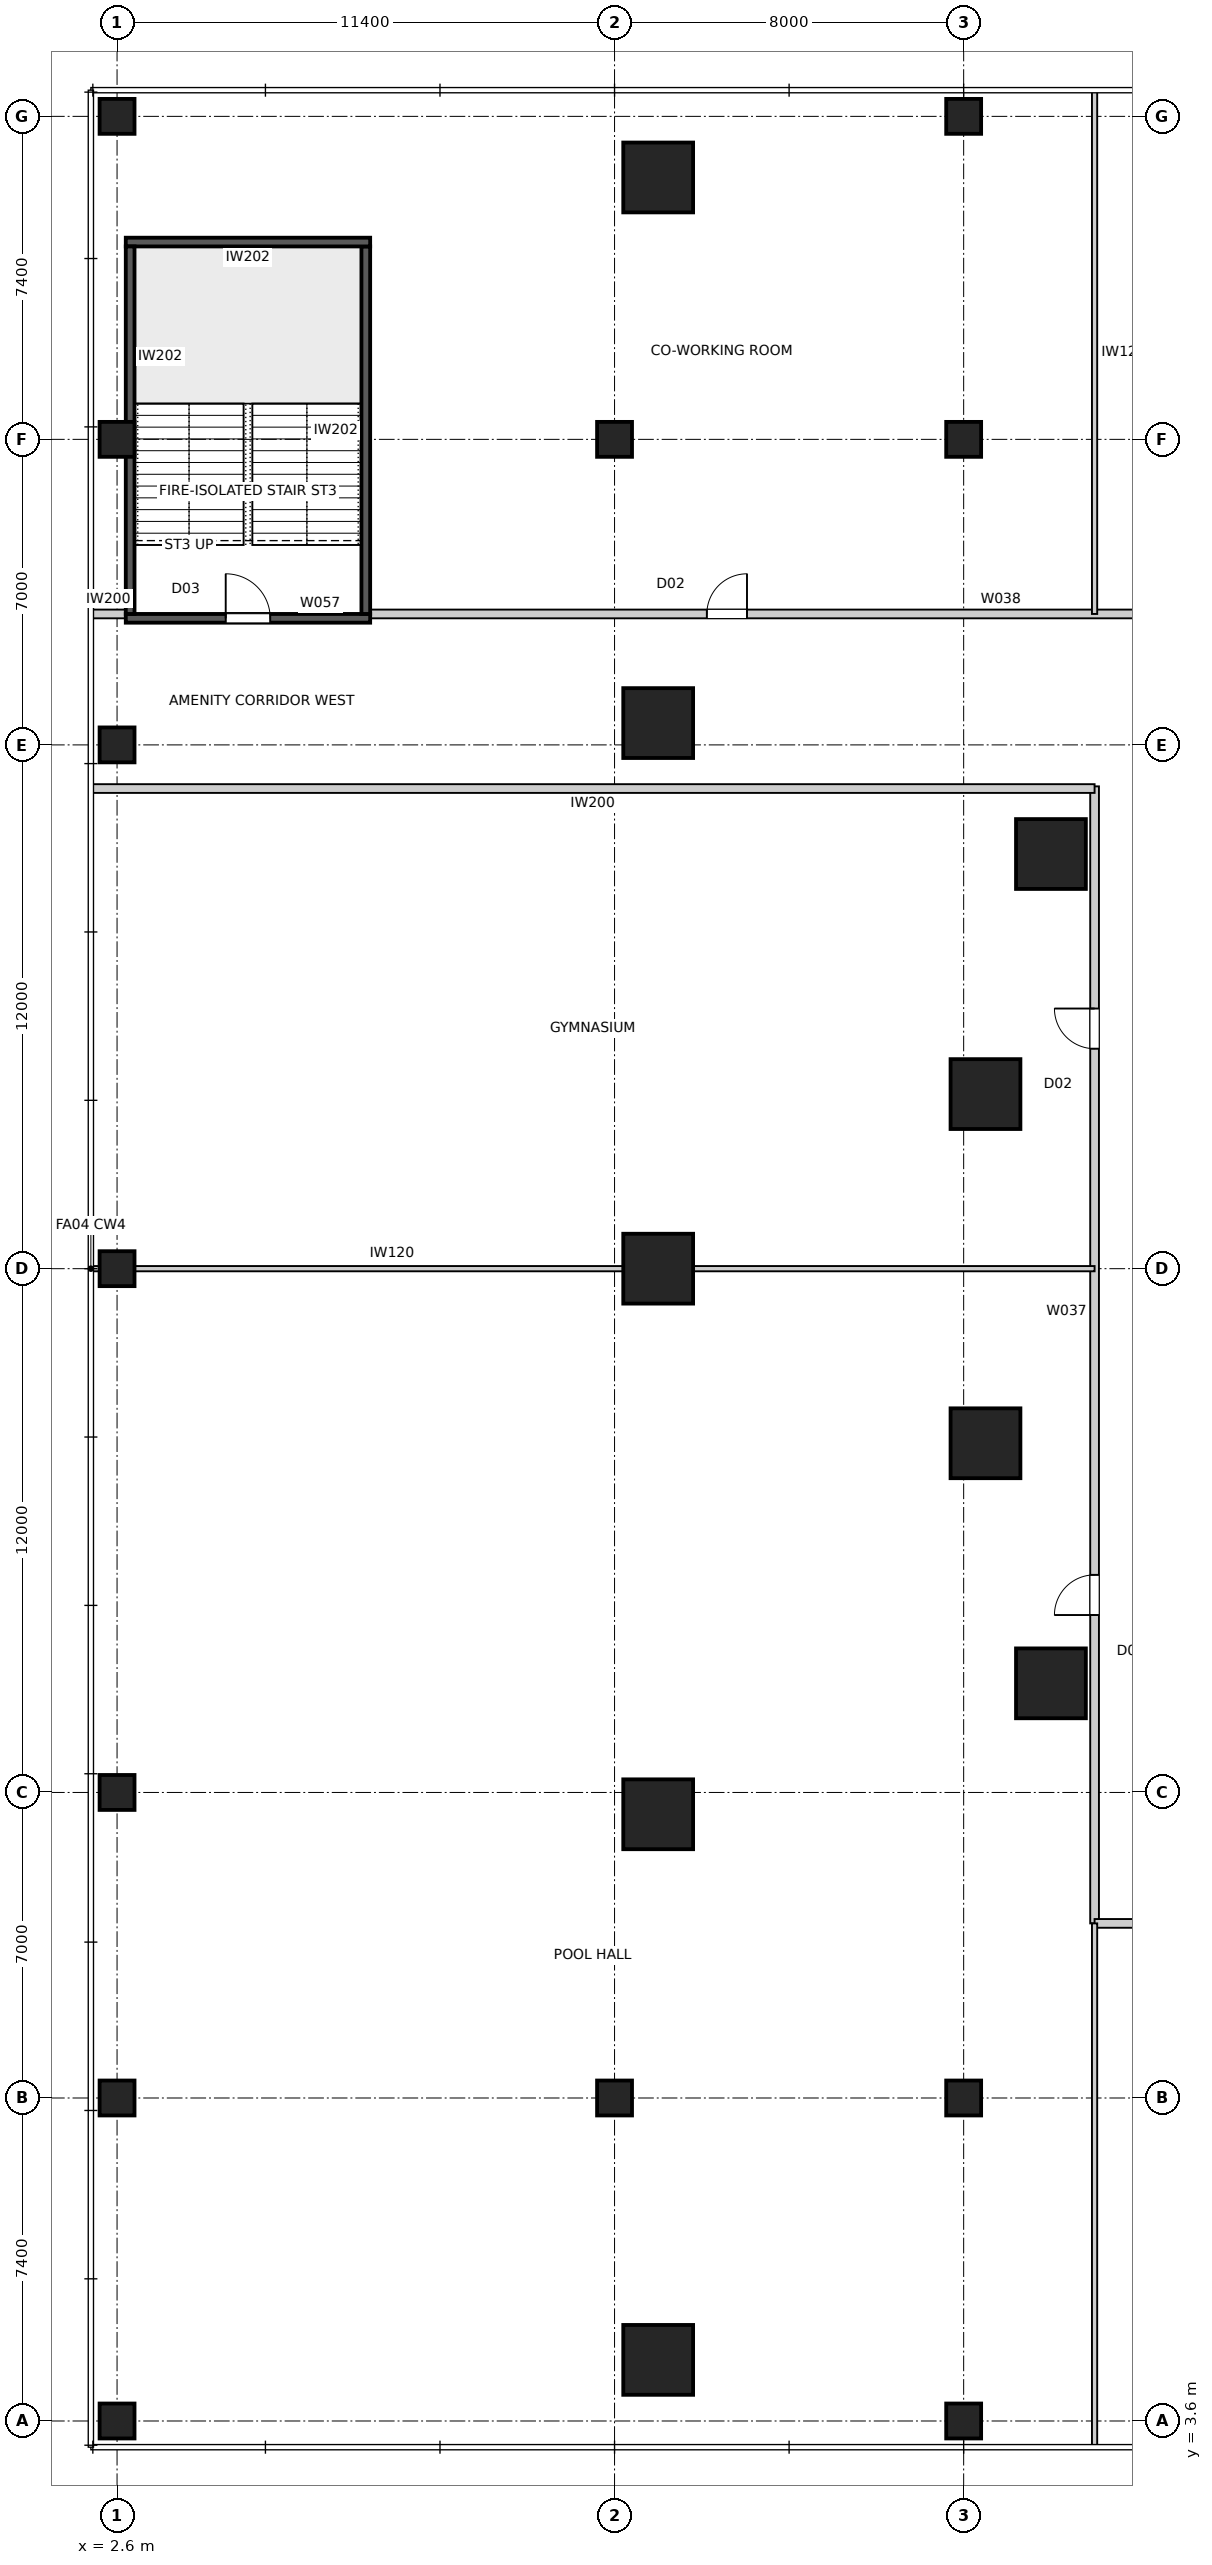
"""IFC4 building model, lengths in metres.
Left out: names, types, materials, properties, quantities, classifications, styles, units other than length and angle.
Written with IfcOpenShell. Run it as: python <this file> out.ifc"""

import sys

from ifc_helpers import new_model, si_unit, direction, frame, frame_2d, origin, origin_2d, place, context, subcontext, project, spatial, rectangle, extrude, element, fill, save


model = new_model("IFC4")
c1 = context("Model", 3, precision=1e-05, world=origin(), true_north=direction((0.0, 1.0)))
c2 = subcontext(c1, "Body", "Model", "MODEL_VIEW")
j1 = project(units=[si_unit("LENGTHUNIT", "METRE"), si_unit("PLANEANGLEUNIT", "RADIAN")], contexts=[c1])
p1 = place(None, origin())
s1 = spatial("IfcSite", under=j1, at=p1, CompositionType="ELEMENT")
p2 = place(p1, origin())
s2 = spatial("IfcBuilding", under=s1, at=p2, CompositionType="ELEMENT")
p3 = place(p2, frame((0.0, 0.0, 6.0)))
s3 = spatial("IfcBuildingStorey", under=s2, at=p3, CompositionType="ELEMENT", Elevation=6.0)
for number, where, z_axis, x_axis in (
    (1, (15.0, 5.0, 0.0), (0.0, 0.0, 1.0), (1.0, 0.0, 0.0)),
    (2, (15.0, 55.0, 0.0), (0.0, 0.0, 1.0), (1.0, 0.0, 0.0)),
    (3, (15.0, 42.5, 0.0), (0.0, 0.0, 1.0), (1.0, 0.0, 0.0)),
    (4, (15.0, 30.0, 0.0), (0.0, 0.0, 1.0), (1.0, 0.0, 0.0)),
    (5, (15.0, 17.5, 0.0), (0.0, 0.0, 1.0), (1.0, 0.0, 0.0)),
):
    element("IfcColumn", number, at=place(p3, frame(where, z_axis=z_axis, x_axis=x_axis)), inside=s3, PredefinedType="COLUMN", context=c2, shape_type="SweptSolid", body=[
        extrude(rectangle(XDim=1.6, YDim=1.6, at=origin_2d()), origin(), (0.0, 0.0, 1.0), 4.5),
    ])
for number, where, z_axis, x_axis in (
    (6, (2.6, 3.6, 0.0), (0.0, 0.0, 1.0), (1.0, 0.0, 0.0)),
    (7, (2.6, 11.0, 0.0), (0.0, 0.0, 1.0), (1.0, 0.0, 0.0)),
    (8, (2.6, 18.0, 0.0), (0.0, 0.0, 1.0), (1.0, 0.0, 0.0)),
    (9, (2.6, 30.0, 0.0), (0.0, 0.0, 1.0), (1.0, 0.0, 0.0)),
    (10, (2.6, 42.0, 0.0), (0.0, 0.0, 1.0), (1.0, 0.0, 0.0)),
    (11, (2.6, 49.0, 0.0), (0.0, 0.0, 1.0), (1.0, 0.0, 0.0)),
    (12, (2.6, 56.4, 0.0), (0.0, 0.0, 1.0), (1.0, 0.0, 0.0)),
    (13, (14.0, 11.0, 0.0), (0.0, 0.0, 1.0), (1.0, 0.0, 0.0)),
    (14, (14.0, 49.0, 0.0), (0.0, 0.0, 1.0), (1.0, 0.0, 0.0)),
    (15, (22.0, 3.6, 0.0), (0.0, 0.0, 1.0), (1.0, 0.0, 0.0)),
    (16, (22.0, 11.0, 0.0), (0.0, 0.0, 1.0), (1.0, 0.0, 0.0)),
    (17, (22.0, 49.0, 0.0), (0.0, 0.0, 1.0), (1.0, 0.0, 0.0)),
    (18, (22.0, 56.4, 0.0), (0.0, 0.0, 1.0), (1.0, 0.0, 0.0)),
):
    element("IfcColumn", number, at=place(p3, frame(where, z_axis=z_axis, x_axis=x_axis)), inside=s3, PredefinedType="COLUMN", context=c2, shape_type="SweptSolid", body=[
        extrude(rectangle(XDim=0.8, YDim=0.8, at=origin_2d()), origin(), (0.0, 0.0, 1.0), 4.5),
    ])
for number, where, z_axis, x_axis in (
    (19, (24.0, 39.5, 0.0), (0.0, 0.0, 1.0), (1.0, 0.0, 0.0)),
    (20, (22.5, 34.0, 0.0), (0.0, 0.0, 1.0), (1.0, 0.0, 0.0)),
    (21, (22.5, 26.0, 0.0), (0.0, 0.0, 1.0), (1.0, 0.0, 0.0)),
    (22, (24.0, 20.5, 0.0), (0.0, 0.0, 1.0), (1.0, 0.0, 0.0)),
):
    element("IfcColumn", number, at=place(p3, frame(where, z_axis=z_axis, x_axis=x_axis)), inside=s3, PredefinedType="COLUMN", context=c2, shape_type="SweptSolid", body=[
        extrude(rectangle(XDim=1.6, YDim=1.6, at=origin_2d()), origin(), (0.0, 0.0, 1.0), 4.5),
    ])
p4 = place(p3, frame((2.8, 44.9, 0.0), z_axis=(0.0, 0.0, 1.0), x_axis=(1.0, 0.0, 0.0)))
e23 = element("IfcWall", 23, at=p4, inside=s3, PredefinedType="SOLIDWALL", context=c2, shape_type="SweptSolid", body=[
    extrude(rectangle(XDim=5.6, YDim=0.2, at=frame_2d((2.8, 0.0))), origin(), (0.0, 0.0, 1.0), 4.15),
])
p5 = place(p4, frame((2.29, 0.0, 0.0)))
e24 = element("IfcOpeningElement", 24, at=p5, cuts=e23, PredefinedType="OPENING", context=c2, shape_type="SweptSolid", body=[
    extrude(rectangle(XDim=1.02, YDim=2.1, at=frame_2d((0.51, 1.05))), frame((0.0, 0.11, 0.0), z_axis=(0.0, -1.0, 0.0), x_axis=(1.0, 0.0, 0.0)), (0.0, 0.0, 1.0), 0.22),
])
p6 = place(p3, frame((8.3, 45.0, 0.0), z_axis=(0.0, 0.0, 1.0), x_axis=(0.0, 1.0, 0.0)))
e25 = element("IfcWall", 25, at=p6, inside=s3, PredefinedType="SOLIDWALL", context=c2, shape_type="SweptSolid", body=[
    extrude(rectangle(XDim=8.42, YDim=0.2, at=frame_2d((4.21, 0.0))), origin(), (0.0, 0.0, 1.0), 4.15),
])
p7 = place(p3, frame((8.4, 53.52, 0.0), z_axis=(0.0, 0.0, 1.0), x_axis=(-1.0, 0.0, 0.0)))
e26 = element("IfcWall", 26, at=p7, inside=s3, PredefinedType="SOLIDWALL", context=c2, shape_type="SweptSolid", body=[
    extrude(rectangle(XDim=5.6, YDim=0.2, at=frame_2d((2.8, 0.0))), origin(), (0.0, 0.0, 1.0), 4.15),
])
p8 = place(p3, frame((2.9, 53.42, 0.0), z_axis=(0.0, 0.0, 1.0), x_axis=(0.0, -1.0, 0.0)))
e27 = element("IfcWall", 27, at=p8, inside=s3, PredefinedType="SOLIDWALL", context=c2, shape_type="SweptSolid", body=[
    extrude(rectangle(XDim=8.42, YDim=0.2, at=frame_2d((4.21, 0.0))), origin(), (0.0, 0.0, 1.0), 4.15),
])
p9 = place(p3, frame((25.0, 15.0, 0.0), z_axis=(0.0, 0.0, 1.0), x_axis=(0.0, 1.0, 0.0)))
e28 = element("IfcWall", 28, at=p9, inside=s3, PredefinedType="PARTITIONING", context=c2, shape_type="SweptSolid", body=[
    extrude(rectangle(XDim=26.05, YDim=0.2, at=frame_2d((13.025, 0.0))), origin(), (0.0, 0.0, 1.0), 4.15),
])
p10 = place(p9, frame((7.065, 0.0, 0.0)))
e29 = element("IfcOpeningElement", 29, at=p10, cuts=e28, PredefinedType="OPENING", context=c2, shape_type="SweptSolid", body=[
    extrude(rectangle(XDim=0.92, YDim=2.34, at=frame_2d((0.46, 1.17))), frame((0.0, 0.11, 0.0), z_axis=(0.0, -1.0, 0.0), x_axis=(1.0, 0.0, 0.0)), (0.0, 0.0, 1.0), 0.22),
])
p11 = place(p9, frame((20.04, 0.0, 0.0)))
e30 = element("IfcOpeningElement", 30, at=p11, cuts=e28, PredefinedType="OPENING", context=c2, shape_type="SweptSolid", body=[
    extrude(rectangle(XDim=0.92, YDim=2.34, at=frame_2d((0.46, 1.17))), frame((0.0, 0.11, 0.0), z_axis=(0.0, -1.0, 0.0), x_axis=(1.0, 0.0, 0.0)), (0.0, 0.0, 1.0), 0.22),
])
p12 = place(p3, frame((8.4, 45.0, 0.0), z_axis=(0.0, 0.0, 1.0), x_axis=(1.0, 0.0, 0.0)))
e31 = element("IfcWall", 31, at=p12, inside=s3, PredefinedType="PARTITIONING", context=c2, shape_type="SweptSolid", body=[
    extrude(rectangle(XDim=36.65, YDim=0.2, at=frame_2d((18.325, 0.0))), origin(), (0.0, 0.0, 1.0), 4.15),
])
p13 = place(p12, frame((31.14, 0.0, 0.0)))
e32 = element("IfcOpeningElement", 32, at=p13, cuts=e31, PredefinedType="OPENING", context=c2, shape_type="SweptSolid", body=[
    extrude(rectangle(XDim=0.92, YDim=2.34, at=frame_2d((0.46, 1.17))), frame((0.0, 0.11, 0.0), z_axis=(0.0, -1.0, 0.0), x_axis=(1.0, 0.0, 0.0)), (0.0, 0.0, 1.0), 0.22),
])
p14 = place(p12, frame((20.265, 0.0, 0.0)))
e33 = element("IfcOpeningElement", 33, at=p14, cuts=e31, PredefinedType="OPENING", context=c2, shape_type="SweptSolid", body=[
    extrude(rectangle(XDim=0.92, YDim=2.34, at=frame_2d((0.46, 1.17))), frame((0.0, 0.11, 0.0), z_axis=(0.0, -1.0, 0.0), x_axis=(1.0, 0.0, 0.0)), (0.0, 0.0, 1.0), 0.22),
])
p15 = place(p12, frame((7.715, 0.0, 0.0)))
e34 = element("IfcOpeningElement", 34, at=p15, cuts=e31, PredefinedType="OPENING", context=c2, shape_type="SweptSolid", body=[
    extrude(rectangle(XDim=0.92, YDim=2.34, at=frame_2d((0.46, 1.17))), frame((0.0, 0.11, 0.0), z_axis=(0.0, -1.0, 0.0), x_axis=(1.0, 0.0, 0.0)), (0.0, 0.0, 1.0), 0.22),
])
p16 = place(p3, frame((71.6, 15.0, 0.0), z_axis=(0.0, 0.0, 1.0), x_axis=(-1.0, 0.0, 0.0)))
e35 = element("IfcWall", 35, at=p16, inside=s3, PredefinedType="PARTITIONING", context=c2, shape_type="SweptSolid", body=[
    extrude(rectangle(XDim=46.6, YDim=0.2, at=frame_2d((23.3, 0.0))), origin(), (0.0, 0.0, 1.0), 4.15),
])
p17 = place(p16, frame((31.14, 0.0, 0.0)))
e36 = element("IfcOpeningElement", 36, at=p17, cuts=e35, PredefinedType="OPENING", context=c2, shape_type="SweptSolid", body=[
    extrude(rectangle(XDim=0.92, YDim=2.34, at=frame_2d((0.46, 1.17))), frame((0.0, 0.11, 0.0), z_axis=(0.0, -1.0, 0.0), x_axis=(1.0, 0.0, 0.0)), (0.0, 0.0, 1.0), 0.22),
])
p18 = place(p16, frame((7.665, 0.0, 0.0)))
e37 = element("IfcOpeningElement", 37, at=p18, cuts=e35, PredefinedType="OPENING", context=c2, shape_type="SweptSolid", body=[
    extrude(rectangle(XDim=1.02, YDim=2.1, at=frame_2d((0.51, 1.05))), frame((0.0, 0.11, 0.0), z_axis=(0.0, -1.0, 0.0), x_axis=(1.0, 0.0, 0.0)), (0.0, 0.0, 1.0), 0.22),
])
p19 = place(p3, frame((25.0, 41.0, 0.0), z_axis=(0.0, 0.0, 1.0), x_axis=(-1.0, 0.0, 0.0)))
e38 = element("IfcWall", 38, at=p19, inside=s3, PredefinedType="PARTITIONING", context=c2, shape_type="SweptSolid", body=[
    extrude(rectangle(XDim=23.0, YDim=0.2, at=frame_2d((11.5, 0.0))), origin(), (0.0, 0.0, 1.0), 4.15),
])
p20 = place(p3, frame((2.0, 45.0, 0.0), z_axis=(0.0, 0.0, 1.0), x_axis=(1.0, 0.0, 0.0)))
e39 = element("IfcWall", 39, at=p20, inside=s3, PredefinedType="PARTITIONING", context=c2, shape_type="SweptSolid", body=[
    extrude(rectangle(XDim=0.8, YDim=0.2, at=frame_2d((0.4, 0.0))), origin(), (0.0, 0.0, 1.0), 4.15),
])
p21 = place(p3, frame((2.0, 30.0, 0.0), z_axis=(0.0, 0.0, 1.0), x_axis=(1.0, 0.0, 0.0)))
e40 = element("IfcWall", 40, at=p21, inside=s3, PredefinedType="PARTITIONING", context=c2, shape_type="SweptSolid", body=[
    extrude(rectangle(XDim=23.0, YDim=0.12, at=frame_2d((11.5, 0.0))), origin(), (0.0, 0.0, 1.0), 4.15),
])
for number, where, z_axis, x_axis in (
    (41, (25.0, 15.0, 0.0), (0.0, 0.0, 1.0), (0.0, -1.0, 0.0)),
    (42, (25.0, 57.0, 0.0), (0.0, 0.0, 1.0), (0.0, -1.0, 0.0)),
):
    element("IfcWall", number, at=place(p3, frame(where, z_axis=z_axis, x_axis=x_axis)), inside=s3, PredefinedType="PARTITIONING", context=c2, shape_type="SweptSolid", body=[
        extrude(rectangle(XDim=12.0, YDim=0.12, at=frame_2d((6.0, 0.0))), origin(), (0.0, 0.0, 1.0), 4.15),
    ])
p22 = place(p10, origin())
e43 = element("IfcDoor", 43, at=p22, inside=s3, OperationType="SINGLE_SWING_LEFT", PredefinedType="DOOR", context=c2, shape_type="SweptSolid", body=[
    extrude(rectangle(XDim=0.92, YDim=2.34, at=frame_2d((0.46, 1.17))), frame((0.0, 0.025, 0.0), z_axis=(0.0, -1.0, 0.0), x_axis=(1.0, 0.0, 0.0)), (0.0, 0.0, 1.0), 0.05),
])
fill(e29, e43)
p23 = place(p11, origin())
e44 = element("IfcDoor", 44, at=p23, inside=s3, OperationType="SINGLE_SWING_RIGHT", PredefinedType="DOOR", context=c2, shape_type="SweptSolid", body=[
    extrude(rectangle(XDim=0.92, YDim=2.34, at=frame_2d((0.46, 1.17))), frame((0.0, 0.025, 0.0), z_axis=(0.0, -1.0, 0.0), x_axis=(1.0, 0.0, 0.0)), (0.0, 0.0, 1.0), 0.05),
])
fill(e30, e44)
p24 = place(p15, origin())
e45 = element("IfcDoor", 45, at=p24, inside=s3, OperationType="SINGLE_SWING_RIGHT", PredefinedType="DOOR", context=c2, shape_type="SweptSolid", body=[
    extrude(rectangle(XDim=0.92, YDim=2.34, at=frame_2d((0.46, 1.17))), frame((0.0, 0.025, 0.0), z_axis=(0.0, -1.0, 0.0), x_axis=(1.0, 0.0, 0.0)), (0.0, 0.0, 1.0), 0.05),
])
fill(e34, e45)
p25 = place(p5, origin())
e46 = element("IfcDoor", 46, at=p25, inside=s3, OperationType="SINGLE_SWING_LEFT", PredefinedType="DOOR", context=c2, shape_type="SweptSolid", body=[
    extrude(rectangle(XDim=1.02, YDim=2.1, at=frame_2d((0.51, 1.05))), frame((0.0, 0.025, 0.0), z_axis=(0.0, -1.0, 0.0), x_axis=(1.0, 0.0, 0.0)), (0.0, 0.0, 1.0), 0.05),
])
fill(e24, e46)
save(model, sys.argv[1])
